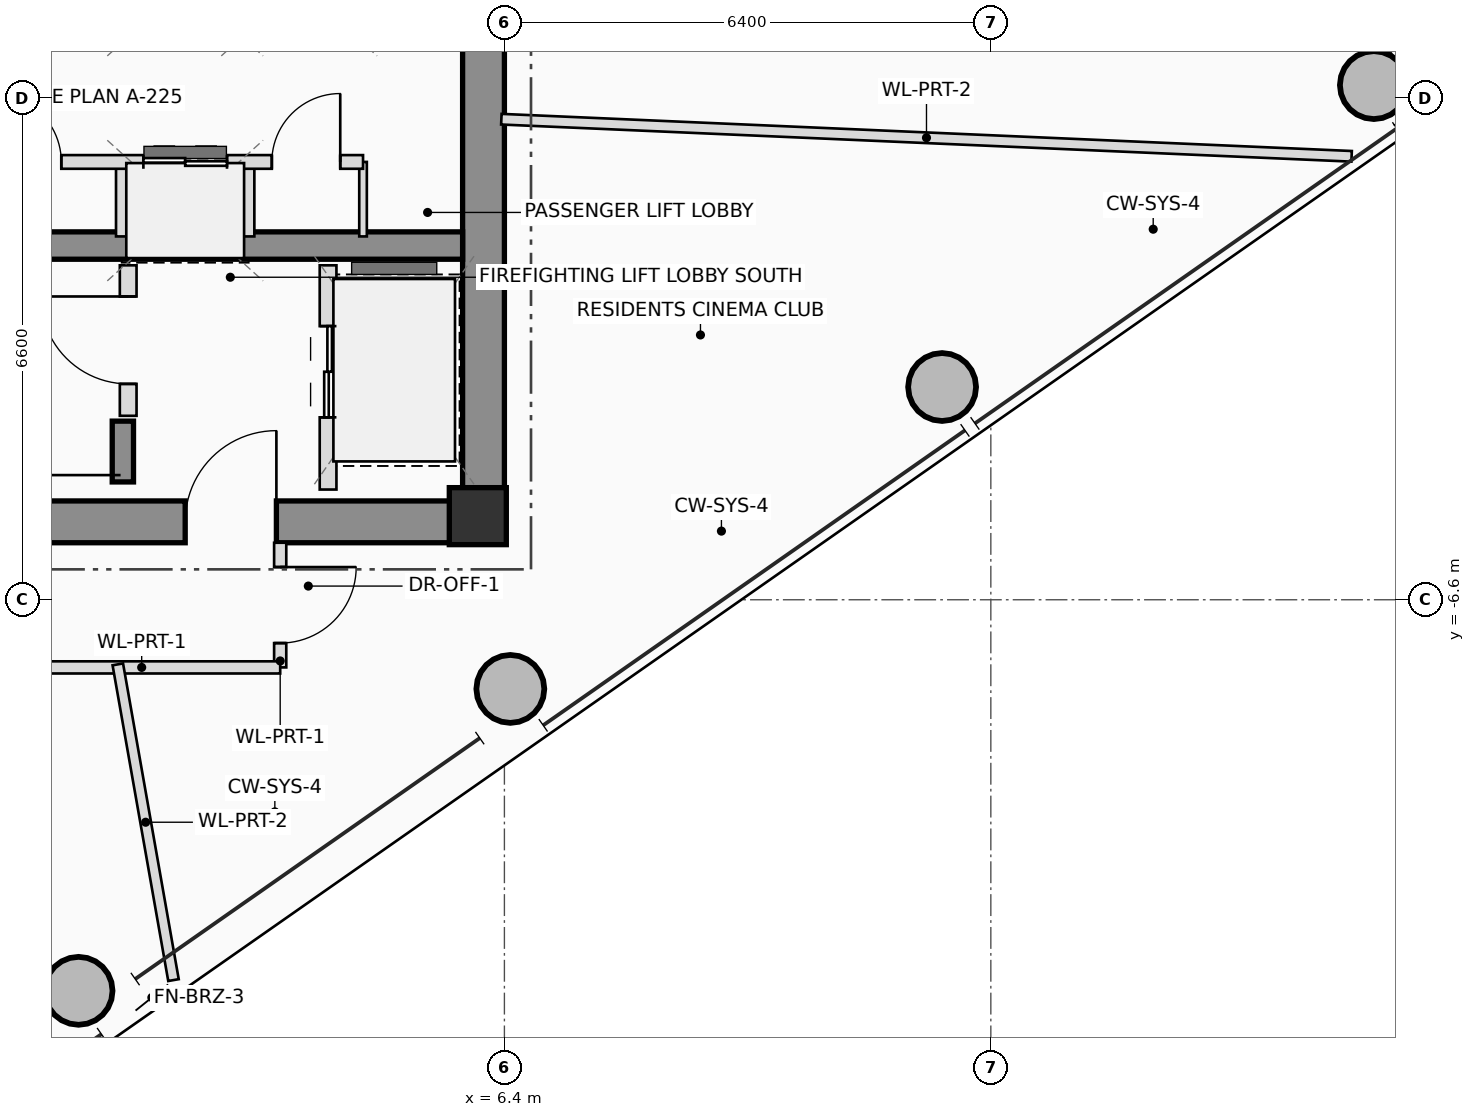
"""IFC4 building model, lengths in metres.
Left out: names, types, materials, properties, quantities, classifications, styles, units other than length and angle.
Written with IfcOpenShell. Run it as: python <this file> out.ifc"""

import sys

from ifc_helpers import new_model, si_unit, direction, frame, frame_2d, origin, origin_2d, place, context, subcontext, project, spatial, rectangle, hollow_circle, extrude, source, transform, mapped, element, fill, save


model = new_model("IFC4")
c1 = context("Model", 3, precision=1e-05, world=origin(), true_north=direction((0.0, 1.0)))
c2 = subcontext(c1, "Body", "Model", "MODEL_VIEW")
j1 = project(units=[si_unit("LENGTHUNIT", "METRE"), si_unit("PLANEANGLEUNIT", "RADIAN")], contexts=[c1])
p1 = place(None, origin())
s1 = spatial("IfcSite", under=j1, at=p1, CompositionType="ELEMENT")
p2 = place(p1, origin())
s2 = spatial("IfcBuilding", under=s1, at=p2, CompositionType="ELEMENT")
p3 = place(p2, frame((0.0, 0.0, 267.75)))
s3 = spatial("IfcBuildingStorey", under=s2, at=p3, CompositionType="ELEMENT", Elevation=267.75)
m1 = source(origin(), c2, "Body", "SweptSolid", [
    extrude(rectangle(XDim=0.75, YDim=0.75, at=origin_2d()), origin(), (0.0, 0.0, 1.0), 3.4),
])
p4 = place(p3, frame((6.05, -5.5, 0.0), z_axis=(0.0, 0.0, 1.0), x_axis=(1.0, 0.0, 0.0)))
e1 = element("IfcColumn", 1, at=p4, inside=s3, PredefinedType="COLUMN", context=c2, shape_type="MappedRepresentation", body=[
    mapped(m1, transform((0.0, 0.0, 0.0), scale=1.0)),
])
p5 = place(p3, frame((-6.4, -5.575, 0.0), z_axis=(0.0, 0.0, 1.0), x_axis=(1.0, 0.0, 0.0)))
e2 = element("IfcWall", 2, at=p5, inside=s3, PredefinedType="SHEAR", context=c2, shape_type="SweptSolid", body=[
    extrude(rectangle(XDim=12.8, YDim=0.55, at=frame_2d((6.4, 0.0))), origin(), (0.0, 0.0, 1.0), 3.4),
])
p6 = place(p5, frame((8.6, 0.0, 0.0)))
e3 = element("IfcOpeningElement", 3, at=p6, cuts=e2, PredefinedType="OPENING", context=c2, shape_type="SweptSolid", body=[
    extrude(rectangle(XDim=1.2, YDim=2.2, at=frame_2d((0.6, 1.1))), frame((0.0, 0.285, 0.0), z_axis=(0.0, -1.0, 0.0), x_axis=(1.0, 0.0, 0.0)), (0.0, 0.0, 1.0), 0.57),
])
p7 = place(p3, frame((6.125, -5.3, 0.0), z_axis=(0.0, 0.0, 1.0), x_axis=(0.0, 1.0, 0.0)))
e4 = element("IfcWall", 4, at=p7, inside=s3, PredefinedType="SHEAR", context=c2, shape_type="SweptSolid", body=[
    extrude(rectangle(XDim=10.6, YDim=0.55, at=frame_2d((5.3, 0.0))), origin(), (0.0, 0.0, 1.0), 3.4),
])
p8 = place(p3, frame((-5.85, -1.94, 0.0), z_axis=(0.0, 0.0, 1.0), x_axis=(1.0, 0.0, 0.0)))
e5 = element("IfcWall", 5, at=p8, inside=s3, PredefinedType="SHEAR", context=c2, shape_type="SweptSolid", body=[
    extrude(rectangle(XDim=11.7, YDim=0.36, at=frame_2d((5.85, 0.0))), origin(), (0.0, 0.0, 1.0), 3.4),
])
p9 = place(p3, frame((1.38, -5.05, 0.0), z_axis=(0.0, 0.0, 1.0), x_axis=(0.0, 1.0, 0.0)))
e6 = element("IfcWall", 6, at=p9, inside=s3, PredefinedType="SHEAR", context=c2, shape_type="SweptSolid", body=[
    extrude(rectangle(XDim=0.8, YDim=0.28, at=frame_2d((0.4, 0.0))), origin(), (0.0, 0.0, 1.0), 3.4),
])
m2 = source(origin(), c2, "Body", "SweptSolid", [
    extrude(hollow_circle(Radius=0.45, WallThickness=0.032, at=origin_2d()), origin(), (0.0, 0.0, 1.0), 3.4),
])
for number, where, z_axis, x_axis in (
    (7, (0.797, -11.745, 0.0), (0.0, 0.0, 1.0), (1.0, 0.0, 0.0)),
    (8, (6.478, -7.773, 0.0), (0.0, 0.0, 1.0), (1.0, 0.0, 0.0)),
    (9, (12.159, -3.801, 0.0), (0.0, 0.0, 1.0), (1.0, 0.0, 0.0)),
    (10, (17.84, 0.171, 0.0), (0.0, 0.0, 1.0), (1.0, 0.0, 0.0)),
):
    element("IfcColumn", number, at=place(p3, frame(where, z_axis=z_axis, x_axis=x_axis)), inside=s3, PredefinedType="COLUMN", context=c2, shape_type="MappedRepresentation", body=[
        mapped(m2, transform((0.0, 0.0, 0.0), scale=1.0)),
    ])
p10 = place(p3, frame((1.45, -4.18, 0.0), z_axis=(0.0, 0.0, 1.0), x_axis=(0.0, 1.0, 0.0)))
e11 = element("IfcWall", 11, at=p10, inside=s3, PredefinedType="PLUMBINGWALL", context=c2, shape_type="SweptSolid", body=[
    extrude(rectangle(XDim=1.98, YDim=0.22, at=frame_2d((0.99, 0.0))), origin(), (0.0, 0.0, 1.0), 3.2),
])
p11 = place(p10, frame((0.42, 0.0, 0.0)))
e12 = element("IfcOpeningElement", 12, at=p11, cuts=e11, PredefinedType="OPENING", context=c2, shape_type="SweptSolid", body=[
    extrude(rectangle(XDim=1.15, YDim=2.15, at=frame_2d((0.575, 1.075))), frame((0.0, 0.12, 0.0), z_axis=(0.0, -1.0, 0.0), x_axis=(1.0, 0.0, 0.0)), (0.0, 0.0, 1.0), 0.24),
])
p12 = place(p3, frame((4.08, -5.15, 0.0), z_axis=(0.0, 0.0, 1.0), x_axis=(0.0, 1.0, 0.0)))
e13 = element("IfcWall", 13, at=p12, inside=s3, PredefinedType="PLUMBINGWALL", context=c2, shape_type="SweptSolid", body=[
    extrude(rectangle(XDim=2.95, YDim=0.22, at=frame_2d((1.475, 0.0))), origin(), (0.0, 0.0, 1.0), 3.2),
])
p13 = place(p12, frame((0.95, 0.0, 0.0)))
e14 = element("IfcOpeningElement", 14, at=p13, cuts=e13, PredefinedType="OPENING", context=c2, shape_type="SweptSolid", body=[
    extrude(rectangle(XDim=1.2, YDim=2.25, at=frame_2d((0.6, 1.125))), frame((0.0, 0.12, 0.0), z_axis=(0.0, -1.0, 0.0), x_axis=(1.0, 0.0, 0.0)), (0.0, 0.0, 1.0), 0.24),
])
for number, where, z_axis, x_axis in (
    (15, (1.38, -1.82, 0.0), (0.0, 0.0, 1.0), (0.0, 1.0, 0.0)),
    (16, (3.02, -1.82, 0.0), (0.0, 0.0, 1.0), (0.0, 1.0, 0.0)),
):
    element("IfcWall", number, at=place(p3, frame(where, z_axis=z_axis, x_axis=x_axis)), inside=s3, PredefinedType="PLUMBINGWALL", context=c2, shape_type="SweptSolid", body=[
        extrude(rectangle(XDim=0.98, YDim=0.18, at=frame_2d((0.49, 0.0))), origin(), (0.0, 0.0, 1.0), 3.2),
    ])
p14 = place(p3, frame((4.54, -1.82, 0.0), z_axis=(0.0, 0.0, 1.0), x_axis=(0.0, 1.0, 0.0)))
e17 = element("IfcWall", 17, at=p14, inside=s3, PredefinedType="PARTITIONING", context=c2, shape_type="SweptSolid", body=[
    extrude(rectangle(XDim=0.98, YDim=0.1, at=frame_2d((0.49, 0.0))), origin(), (0.0, 0.0, 1.0), 3.2),
])
p15 = place(p3, frame((-5.68, -0.84, 0.0), z_axis=(0.0, 0.0, 1.0), x_axis=(1.0, 0.0, 0.0)))
e18 = element("IfcWall", 18, at=p15, inside=s3, PredefinedType="PLUMBINGWALL", context=c2, shape_type="SweptSolid", body=[
    extrude(rectangle(XDim=10.22, YDim=0.18, at=frame_2d((5.11, 0.0))), origin(), (0.0, 0.0, 1.0), 3.2),
])
p16 = place(p15, frame((1.88, 0.0, 0.0)))
e19 = element("IfcOpeningElement", 19, at=p16, cuts=e18, PredefinedType="OPENING", context=c2, shape_type="SweptSolid", body=[
    extrude(rectangle(XDim=0.9, YDim=2.05, at=frame_2d((0.45, 1.025))), frame((0.0, 0.1, 0.0), z_axis=(0.0, -1.0, 0.0), x_axis=(1.0, 0.0, 0.0)), (0.0, 0.0, 1.0), 0.2),
])
p17 = place(p15, frame((5.35, 0.0, 0.0)))
e20 = element("IfcOpeningElement", 20, at=p17, cuts=e18, PredefinedType="OPENING", context=c2, shape_type="SweptSolid", body=[
    extrude(rectangle(XDim=0.9, YDim=2.05, at=frame_2d((0.45, 1.025))), frame((0.0, 0.1, 0.0), z_axis=(0.0, -1.0, 0.0), x_axis=(1.0, 0.0, 0.0)), (0.0, 0.0, 1.0), 0.2),
])
p18 = place(p15, frame((7.33, 0.0, 0.0)))
e21 = element("IfcOpeningElement", 21, at=p18, cuts=e18, PredefinedType="OPENING", context=c2, shape_type="SweptSolid", body=[
    extrude(rectangle(XDim=1.1, YDim=2.2, at=frame_2d((0.55, 1.1))), frame((0.0, 0.1, 0.0), z_axis=(0.0, -1.0, 0.0), x_axis=(1.0, 0.0, 0.0)), (0.0, 0.0, 1.0), 0.2),
])
p19 = place(p15, frame((9.02, 0.0, 0.0)))
e22 = element("IfcOpeningElement", 22, at=p19, cuts=e18, PredefinedType="OPENING", context=c2, shape_type="SweptSolid", body=[
    extrude(rectangle(XDim=0.9, YDim=2.05, at=frame_2d((0.45, 1.025))), frame((0.0, 0.1, 0.0), z_axis=(0.0, -1.0, 0.0), x_axis=(1.0, 0.0, 0.0)), (0.0, 0.0, 1.0), 0.2),
])
p20 = place(p3, frame((3.45, -5.85, 0.0), z_axis=(0.0, 0.0, 1.0), x_axis=(0.0, -1.0, 0.0)))
e23 = element("IfcWall", 23, at=p20, inside=s3, PredefinedType="PARTITIONING", context=c2, shape_type="SweptSolid", body=[
    extrude(rectangle(XDim=1.64, YDim=0.16, at=frame_2d((0.82, 0.0))), origin(), (0.0, 0.0, 1.0), 3.2),
])
p21 = place(p20, frame((0.32, 0.0, 0.0)))
e24 = element("IfcOpeningElement", 24, at=p21, cuts=e23, PredefinedType="OPENING", context=c2, shape_type="SweptSolid", body=[
    extrude(rectangle(XDim=1.0, YDim=2.25, at=frame_2d((0.5, 1.125))), frame((0.0, 0.09, 0.0), z_axis=(0.0, -1.0, 0.0), x_axis=(1.0, 0.0, 0.0)), (0.0, 0.0, 1.0), 0.18),
])
p22 = place(p3, frame((3.45, -7.49, 0.0), z_axis=(0.0, 0.0, 1.0), x_axis=(-1.0, 0.0, 0.0)))
e25 = element("IfcWall", 25, at=p22, inside=s3, PredefinedType="PARTITIONING", context=c2, shape_type="SweptSolid", body=[
    extrude(rectangle(XDim=9.81, YDim=0.16, at=frame_2d((4.905, 0.0))), origin(), (0.0, 0.0, 1.0), 2.605),
])
p23 = place(p22, frame((3.795, 0.0, 0.0)))
e26 = element("IfcOpeningElement", 26, at=p23, cuts=e25, PredefinedType="OPENING", context=c2, shape_type="SweptSolid", body=[
    extrude(rectangle(XDim=1.0, YDim=2.25, at=frame_2d((0.5, 1.125))), frame((0.0, 0.09, 0.0), z_axis=(0.0, -1.0, 0.0), x_axis=(1.0, 0.0, 0.0)), (0.0, 0.0, 1.0), 0.18),
])
p24 = place(p22, frame((7.553, 0.0, 0.0)))
e27 = element("IfcOpeningElement", 27, at=p24, cuts=e25, PredefinedType="OPENING", context=c2, shape_type="SweptSolid", body=[
    extrude(rectangle(XDim=1.0, YDim=2.25, at=frame_2d((0.5, 1.125))), frame((0.0, 0.09, 0.0), z_axis=(0.0, -1.0, 0.0), x_axis=(1.0, 0.0, 0.0)), (0.0, 0.0, 1.0), 0.18),
])
p25 = place(p3, frame((6.36, -0.278, 0.0), z_axis=(0.0, 0.0, 1.0), x_axis=(0.999047788643, -0.043629302162, 0.0)))
e28 = element("IfcWall", 28, at=p25, inside=s3, PredefinedType="PARTITIONING", context=c2, shape_type="SweptSolid", body=[
    extrude(rectangle(XDim=11.197, YDim=0.14, at=frame_2d((5.599, 0.0))), origin(), (0.0, 0.0, 1.0), 2.765),
])
p26 = place(p3, frame((1.314, -7.45, 0.0), z_axis=(0.0, 0.0, 1.0), x_axis=(0.17364664795, -0.984808022741, 0.0)))
e29 = element("IfcWall", 29, at=p26, inside=s3, PredefinedType="PARTITIONING", context=c2, shape_type="SweptSolid", body=[
    extrude(rectangle(XDim=4.218, YDim=0.14, at=frame_2d((2.109, 0.0))), origin(), (0.0, 0.0, 1.0), 2.605),
])
p27 = place(p6, origin())
e30 = element("IfcDoor", 30, at=p27, inside=s3, OperationType="SINGLE_SWING_RIGHT", PredefinedType="DOOR", context=c2, shape_type="SweptSolid", body=[
    extrude(rectangle(XDim=1.2, YDim=2.2, at=frame_2d((0.6, 1.1))), frame((0.0, 0.025, 0.0), z_axis=(0.0, -1.0, 0.0), x_axis=(1.0, 0.0, 0.0)), (0.0, 0.0, 1.0), 0.05),
])
fill(e3, e30)
p28 = place(p11, origin())
e31 = element("IfcDoor", 31, at=p28, inside=s3, OperationType="SINGLE_SWING_RIGHT", PredefinedType="DOOR", context=c2, shape_type="SweptSolid", body=[
    extrude(rectangle(XDim=1.15, YDim=2.15, at=frame_2d((0.575, 1.075))), frame((0.0, 0.025, 0.0), z_axis=(0.0, -1.0, 0.0), x_axis=(1.0, 0.0, 0.0)), (0.0, 0.0, 1.0), 0.05),
])
fill(e12, e31)
p29 = place(p13, origin())
e32 = element("IfcDoor", 32, at=p29, inside=s3, OperationType="DOUBLE_DOOR_SLIDING", PredefinedType="DOOR", context=c2, shape_type="SweptSolid", body=[
    extrude(rectangle(XDim=1.2, YDim=2.25, at=frame_2d((0.6, 1.125))), frame((0.0, 0.025, 0.0), z_axis=(0.0, -1.0, 0.0), x_axis=(1.0, 0.0, 0.0)), (0.0, 0.0, 1.0), 0.05),
])
fill(e14, e32)
p30 = place(p17, origin())
e33 = element("IfcDoor", 33, at=p30, inside=s3, OperationType="SINGLE_SWING_LEFT", PredefinedType="DOOR", context=c2, shape_type="SweptSolid", body=[
    extrude(rectangle(XDim=0.9, YDim=2.05, at=frame_2d((0.45, 1.025))), frame((0.0, 0.025, 0.0), z_axis=(0.0, -1.0, 0.0), x_axis=(1.0, 0.0, 0.0)), (0.0, 0.0, 1.0), 0.05),
])
fill(e20, e33)
p31 = place(p18, origin())
e34 = element("IfcDoor", 34, at=p31, inside=s3, OperationType="DOUBLE_DOOR_SLIDING", PredefinedType="DOOR", context=c2, shape_type="SweptSolid", body=[
    extrude(rectangle(XDim=1.1, YDim=2.2, at=frame_2d((0.55, 1.1))), frame((0.0, 0.025, 0.0), z_axis=(0.0, -1.0, 0.0), x_axis=(1.0, 0.0, 0.0)), (0.0, 0.0, 1.0), 0.05),
])
fill(e21, e34)
p32 = place(p19, origin())
e35 = element("IfcDoor", 35, at=p32, inside=s3, OperationType="SINGLE_SWING_RIGHT", PredefinedType="DOOR", context=c2, shape_type="SweptSolid", body=[
    extrude(rectangle(XDim=0.9, YDim=2.05, at=frame_2d((0.45, 1.025))), frame((0.0, 0.025, 0.0), z_axis=(0.0, -1.0, 0.0), x_axis=(1.0, 0.0, 0.0)), (0.0, 0.0, 1.0), 0.05),
])
fill(e22, e35)
p33 = place(p21, origin())
e36 = element("IfcDoor", 36, at=p33, inside=s3, OperationType="SINGLE_SWING_LEFT", PredefinedType="DOOR", context=c2, shape_type="SweptSolid", body=[
    extrude(rectangle(XDim=1.0, YDim=2.25, at=frame_2d((0.5, 1.125))), frame((0.0, 0.025, 0.0), z_axis=(0.0, -1.0, 0.0), x_axis=(1.0, 0.0, 0.0)), (0.0, 0.0, 1.0), 0.05),
])
fill(e24, e36)
save(model, sys.argv[1])
